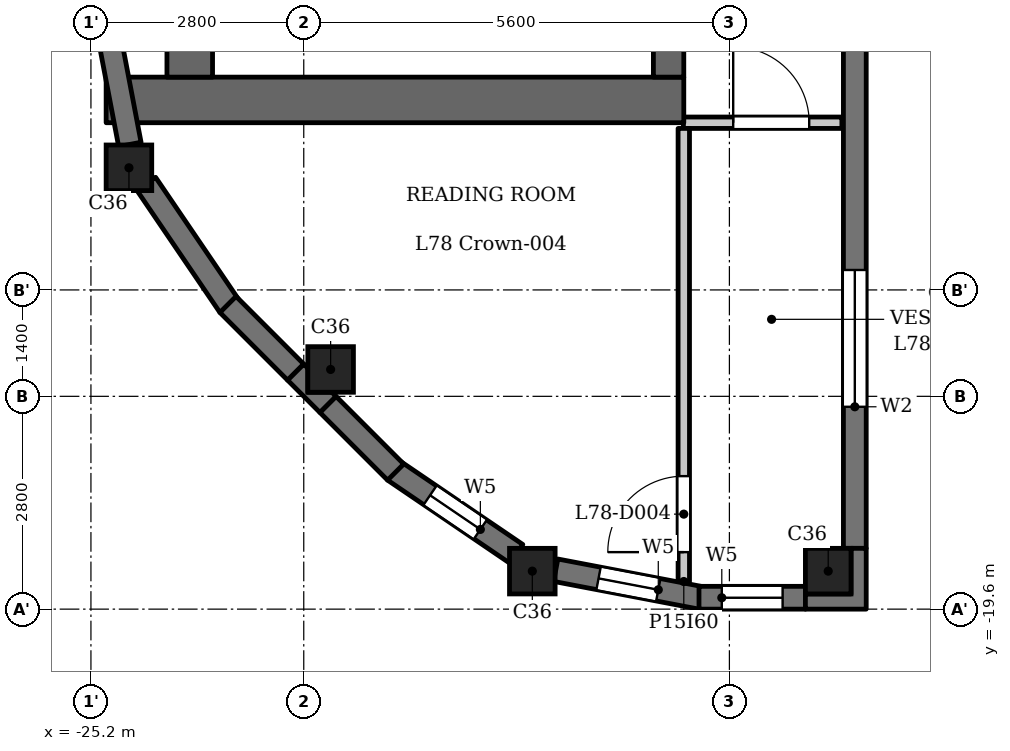
"""IFC4 building model, lengths in metres.
Left out: names, types, materials, properties, quantities, classifications, styles, units other than length and angle.
Written with IfcOpenShell. Run it as: python <this file> out.ifc"""

import sys

from ifc_helpers import new_model, si_unit, direction, frame, frame_2d, origin, origin_2d, place, context, subcontext, project, spatial, polyline, rectangle, outline, extrude, element, fill, save


model = new_model("IFC4")
c1 = context("Model", 3, precision=1e-05, world=origin(), true_north=direction((0.0, 1.0)))
c2 = subcontext(c1, "Body", "Model", "MODEL_VIEW")
j1 = project(units=[si_unit("LENGTHUNIT", "METRE"), si_unit("PLANEANGLEUNIT", "RADIAN")], contexts=[c1])
p1 = place(None, origin())
s1 = spatial("IfcSite", under=j1, at=p1, CompositionType="ELEMENT")
p2 = place(p1, origin())
s2 = spatial("IfcBuilding", under=s1, at=p2, CompositionType="ELEMENT")
p3 = place(p2, frame((0.0, 0.0, 303.4)))
s3 = spatial("IfcBuildingStorey", under=s2, at=p3, CompositionType="ELEMENT", Elevation=303.4)
for number, where, z_axis, x_axis in (
    (1, (-24.7, -13.793, 0.0), (0.0, 0.0, 1.0), (1.0, 0.0, 0.0)),
    (2, (-22.046, -16.446, 0.0), (0.0, 0.0, 1.0), (1.0, 0.0, 0.0)),
    (3, (-19.393, -19.1, 0.0), (0.0, 0.0, 1.0), (1.0, 0.0, 0.0)),
    (4, (-15.5, -19.1, 0.0), (0.0, 0.0, 1.0), (1.0, 0.0, 0.0)),
):
    element("IfcColumn", number, at=place(p3, frame(where, z_axis=z_axis, x_axis=x_axis)), inside=s3, PredefinedType="COLUMN", context=c2, shape_type="SweptSolid", body=[
        extrude(rectangle(XDim=0.6, YDim=0.6, at=origin_2d()), origin(), (0.0, 0.0, 1.0), 3.5),
    ])
p4 = place(p3, frame((-21.213, -17.779, 0.0), z_axis=(0.0, 0.0, 1.0), x_axis=(0.827022075481, -0.562169446579, 0.0)))
e5 = element("IfcWall", 5, at=p4, inside=s3, PredefinedType="SOLIDWALL", context=c2, shape_type="SweptSolid", body=[
    extrude(rectangle(XDim=1.948, YDim=0.3, at=frame_2d((0.974, 0.0))), origin(), (0.0, 0.0, 1.0), 2.6),
])
p5 = place(p4, frame((0.574, 0.0, 0.6)))
e6 = element("IfcOpeningElement", 6, at=p5, cuts=e5, PredefinedType="OPENING", context=c2, shape_type="SweptSolid", body=[
    extrude(rectangle(XDim=0.8, YDim=1.55, at=frame_2d((0.4, 0.775))), frame((0.0, 0.16, 0.0), z_axis=(0.0, -1.0, 0.0), x_axis=(1.0, 0.0, 0.0)), (0.0, 0.0, 1.0), 0.32),
])
p6 = place(p3, frame((-19.085, -19.088, 0.0), z_axis=(0.0, 0.0, 1.0), x_axis=(0.982286967073, -0.187382801553, 0.0)))
e7 = element("IfcWall", 7, at=p6, inside=s3, PredefinedType="SOLIDWALL", context=c2, shape_type="SweptSolid", body=[
    extrude(rectangle(XDim=1.948, YDim=0.3, at=frame_2d((0.974, 0.0))), origin(), (0.0, 0.0, 1.0), 2.6),
])
p7 = place(p6, frame((0.574, 0.0, 0.6)))
e8 = element("IfcOpeningElement", 8, at=p7, cuts=e7, PredefinedType="OPENING", context=c2, shape_type="SweptSolid", body=[
    extrude(rectangle(XDim=0.8, YDim=1.55, at=frame_2d((0.4, 0.775))), frame((0.0, 0.16, 0.0), z_axis=(0.0, -1.0, 0.0), x_axis=(1.0, 0.0, 0.0)), (0.0, 0.0, 1.0), 0.32),
])
p8 = place(p3, frame((-17.2, -19.45, 0.0), z_axis=(0.0, 0.0, 1.0), x_axis=(1.0, 0.0, 0.0)))
e9 = element("IfcWall", 9, at=p8, inside=s3, PredefinedType="SOLIDWALL", context=c2, shape_type="SweptSolid", body=[
    extrude(rectangle(XDim=1.4, YDim=0.3, at=frame_2d((0.7, 0.0))), origin(), (0.0, 0.0, 1.0), 3.2),
])
p9 = place(p8, frame((0.3, 0.0, 0.6)))
e10 = element("IfcOpeningElement", 10, at=p9, cuts=e9, PredefinedType="OPENING", context=c2, shape_type="SweptSolid", body=[
    extrude(rectangle(XDim=0.8, YDim=1.55, at=frame_2d((0.4, 0.775))), frame((0.0, 0.16, 0.0), z_axis=(0.0, -1.0, 0.0), x_axis=(1.0, 0.0, 0.0)), (0.0, 0.0, 1.0), 0.32),
])
p10 = place(p3, frame((-15.15, -18.8, 0.0), z_axis=(0.0, 0.0, 1.0), x_axis=(0.0, 1.0, 0.0)))
e11 = element("IfcWall", 11, at=p10, inside=s3, PredefinedType="SOLIDWALL", context=c2, shape_type="SweptSolid", body=[
    extrude(rectangle(XDim=7.3, YDim=0.3, at=frame_2d((3.65, 0.0))), origin(), (0.0, 0.0, 1.0), 3.2),
])
p11 = place(p10, frame((1.863, 0.0, 0.9)))
e12 = element("IfcOpeningElement", 12, at=p11, cuts=e11, PredefinedType="OPENING", context=c2, shape_type="SweptSolid", body=[
    extrude(rectangle(XDim=1.8, YDim=1.25, at=frame_2d((0.9, 0.625))), frame((0.0, 0.16, 0.0), z_axis=(0.0, -1.0, 0.0), x_axis=(1.0, 0.0, 0.0)), (0.0, 0.0, 1.0), 0.32),
])
p12 = place(p3, frame((-25.052, -11.573, 0.0), z_axis=(0.0, 0.0, 1.0), x_axis=(0.187354129902, -0.982292436095, 0.0)))
e13 = element("IfcWall", 13, at=p12, inside=s3, PredefinedType="SOLIDWALL", context=c2, shape_type="SweptSolid", body=[
    extrude(rectangle(XDim=1.947, YDim=0.3, at=frame_2d((0.973, 0.0))), origin(), (0.0, 0.0, 1.0), 2.6),
])
p13 = place(p3, frame((-24.474, -14.002, 0.0), z_axis=(0.0, 0.0, 1.0), x_axis=(0.562025435703, -0.827119948752, 0.0)))
e14 = element("IfcWall", 14, at=p13, inside=s3, PredefinedType="SOLIDWALL", context=c2, shape_type="SweptSolid", body=[
    extrude(rectangle(XDim=1.948, YDim=0.3, at=frame_2d((0.974, 0.0))), origin(), (0.0, 0.0, 1.0), 2.6),
])
for number, where, z_axis, x_axis in (
    (15, (-23.397, -15.591, 0.0), (0.0, 0.0, 1.0), (0.707, -0.707, 0.0)),
    (16, (-22.082, -16.906, 0.0), (0.0, 0.0, 1.0), (0.707, -0.707, 0.0)),
):
    element("IfcWall", number, at=place(p3, frame(where, z_axis=z_axis, x_axis=x_axis)), inside=s3, PredefinedType="SOLIDWALL", context=c2, shape_type="SweptSolid", body=[
        extrude(rectangle(XDim=1.26, YDim=0.3, at=frame_2d((0.63, 0.0))), origin(), (0.0, 0.0, 1.0), 3.2),
    ])
p14 = place(p3, frame((-17.4, -12.9, 0.0), z_axis=(0.0, 0.0, 1.0), x_axis=(-1.0, 0.0, 0.0)))
e17 = element("IfcWall", 17, at=p14, inside=s3, PredefinedType="SHEAR", context=c2, shape_type="SweptSolid", body=[
    extrude(rectangle(XDim=7.6, YDim=0.6, at=frame_2d((3.8, 0.0))), origin(), (0.0, 0.0, 1.0), 3.2),
])
p15 = place(p3, frame((-17.6, -12.6, 0.0), z_axis=(0.0, 0.0, 1.0), x_axis=(0.0, 1.0, 0.0)))
e18 = element("IfcWall", 18, at=p15, inside=s3, PredefinedType="SHEAR", context=c2, shape_type="SweptSolid", body=[
    extrude(rectangle(XDim=25.2, YDim=0.4, at=frame_2d((12.6, 0.0))), origin(), (0.0, 0.0, 1.0), 3.2),
])
p16 = place(p15, frame((8.8, 0.0, 0.0)))
e19 = element("IfcOpeningElement", 19, at=p16, cuts=e18, PredefinedType="OPENING", context=c2, shape_type="SweptSolid", body=[
    extrude(rectangle(XDim=0.9, YDim=2.1, at=frame_2d((0.45, 1.05))), frame((0.0, 0.21, 0.0), z_axis=(0.0, -1.0, 0.0), x_axis=(1.0, 0.0, 0.0)), (0.0, 0.0, 1.0), 0.42),
])
p17 = place(p15, frame((17.05, 0.0, 0.0)))
e20 = element("IfcOpeningElement", 20, at=p17, cuts=e18, PredefinedType="OPENING", context=c2, shape_type="SweptSolid", body=[
    extrude(rectangle(XDim=0.9, YDim=2.1, at=frame_2d((0.45, 1.05))), frame((0.0, 0.21, 0.0), z_axis=(0.0, -1.0, 0.0), x_axis=(1.0, 0.0, 0.0)), (0.0, 0.0, 1.0), 0.42),
])
p18 = place(p15, frame((23.25, 0.0, 0.0)))
e21 = element("IfcOpeningElement", 21, at=p18, cuts=e18, PredefinedType="OPENING", context=c2, shape_type="SweptSolid", body=[
    extrude(rectangle(XDim=1.1, YDim=2.1, at=frame_2d((0.55, 1.05))), frame((0.0, 0.21, 0.0), z_axis=(0.0, -1.0, 0.0), x_axis=(1.0, 0.0, 0.0)), (0.0, 0.0, 1.0), 0.42),
])
p19 = place(p15, frame((0.85, 0.0, 0.0)))
e22 = element("IfcOpeningElement", 22, at=p19, cuts=e18, PredefinedType="OPENING", context=c2, shape_type="SweptSolid", body=[
    extrude(rectangle(XDim=1.1, YDim=2.1, at=frame_2d((0.55, 1.05))), frame((0.0, 0.21, 0.0), z_axis=(0.0, -1.0, 0.0), x_axis=(1.0, 0.0, 0.0)), (0.0, 0.0, 1.0), 0.42),
])
p20 = place(p15, frame((13.075, 0.0, 0.0)))
e23 = element("IfcOpeningElement", 23, at=p20, cuts=e18, PredefinedType="OPENING", context=c2, shape_type="SweptSolid", body=[
    extrude(rectangle(XDim=1.8, YDim=2.1, at=frame_2d((0.9, 1.05))), frame((0.0, 0.21, 0.0), z_axis=(0.0, -1.0, 0.0), x_axis=(1.0, 0.0, 0.0)), (0.0, 0.0, 1.0), 0.42),
])
p21 = place(p3, frame((-23.9, -12.6, 0.0), z_axis=(0.0, 0.0, 1.0), x_axis=(0.0, 1.0, 0.0)))
e24 = element("IfcWall", 24, at=p21, inside=s3, PredefinedType="SHEAR", context=c2, shape_type="SweptSolid", body=[
    extrude(rectangle(XDim=25.2, YDim=0.6, at=frame_2d((12.6, 0.0))), origin(), (0.0, 0.0, 1.0), 3.2),
])
p22 = place(p3, frame((-17.405, -13.2, 0.0), z_axis=(0.0, 0.0, 1.0), x_axis=(1.0, 0.0, 0.0)))
e25 = element("IfcWall", 25, at=p22, inside=s3, PredefinedType="PARTITIONING", context=c2, shape_type="SweptSolid", body=[
    extrude(rectangle(XDim=2.085, YDim=0.15, at=frame_2d((1.042, 0.0))), origin(), (0.0, 0.0, 1.0), 3.2),
])
p23 = place(p22, frame((0.655, 0.0, 0.0)))
e26 = element("IfcOpeningElement", 26, at=p23, cuts=e25, PredefinedType="OPENING", context=c2, shape_type="SweptSolid", body=[
    extrude(rectangle(XDim=1.0, YDim=2.1, at=frame_2d((0.5, 1.05))), frame((0.0, 0.085, 0.0), z_axis=(0.0, -1.0, 0.0), x_axis=(1.0, 0.0, 0.0)), (0.0, 0.0, 1.0), 0.17),
])
p24 = place(p3, frame((-17.4, -19.236, 0.0), z_axis=(0.0, 0.0, 1.0), x_axis=(0.0, 1.0, 0.0)))
e27 = element("IfcWall", 27, at=p24, inside=s3, PredefinedType="PARTITIONING", context=c2, shape_type="SweptSolid", body=[
    extrude(rectangle(XDim=5.961, YDim=0.15, at=frame_2d((2.981, 0.0))), origin(), (0.0, 0.0, 1.0), 3.2),
])
p25 = place(p24, frame((0.386, 0.0, 0.0)))
e28 = element("IfcOpeningElement", 28, at=p25, cuts=e27, PredefinedType="OPENING", context=c2, shape_type="SweptSolid", body=[
    extrude(rectangle(XDim=1.0, YDim=2.1, at=frame_2d((0.5, 1.05))), frame((0.0, 0.085, 0.0), z_axis=(0.0, -1.0, 0.0), x_axis=(1.0, 0.0, 0.0)), (0.0, 0.0, 1.0), 0.17),
])
p26 = place(p3, origin())
e29 = element("IfcWall", 29, at=p26, inside=s3, PredefinedType="SOLIDWALL", context=c2, shape_type="SweptSolid", body=[
    extrude(outline(polyline([(-15.8, -19.6), (-15.0, -19.6), (-15.0, -18.8), (-15.2, -18.8), (-15.2, -19.4), (-15.8, -19.4), (-15.8, -19.6)])), origin(), (0.0, 0.0, 1.0), 3.2),
])
e30 = element("IfcWall", 30, at=p26, inside=s3, PredefinedType="SOLIDWALL", context=c2, shape_type="SweptSolid", body=[
    extrude(outline(polyline([(-22.4, -16.376), (-22.612, -16.588), (-22.188, -17.012), (-21.976, -16.8), (-22.029, -16.746), (-22.346, -16.746), (-22.346, -16.429), (-22.4, -16.376)])), origin(), (0.0, 0.0, 1.0), 3.2),
])
p27 = place(p23, origin())
e31 = element("IfcDoor", 31, at=p27, inside=s3, OperationType="SINGLE_SWING_RIGHT", PredefinedType="DOOR", context=c2, shape_type="SweptSolid", body=[
    extrude(rectangle(XDim=1.0, YDim=2.1, at=frame_2d((0.5, 1.05))), frame((0.0, 0.025, 0.0), z_axis=(0.0, -1.0, 0.0), x_axis=(1.0, 0.0, 0.0)), (0.0, 0.0, 1.0), 0.05),
])
fill(e26, e31)
p28 = place(p25, origin())
e32 = element("IfcDoor", 32, at=p28, inside=s3, OperationType="SINGLE_SWING_RIGHT", PredefinedType="DOOR", context=c2, shape_type="SweptSolid", body=[
    extrude(rectangle(XDim=1.0, YDim=2.1, at=frame_2d((0.5, 1.05))), frame((0.0, 0.025, 0.0), z_axis=(0.0, -1.0, 0.0), x_axis=(1.0, 0.0, 0.0)), (0.0, 0.0, 1.0), 0.05),
])
fill(e28, e32)
p29 = place(p5, origin())
e33 = element("IfcWindow", 33, at=p29, inside=s3, PartitioningType="SINGLE_PANEL", PredefinedType="WINDOW", context=c2, shape_type="SweptSolid", body=[
    extrude(rectangle(XDim=0.8, YDim=1.55, at=frame_2d((0.4, 0.775))), frame((0.0, 0.03, 0.0), z_axis=(0.0, -1.0, 0.0), x_axis=(1.0, 0.0, 0.0)), (0.0, 0.0, 1.0), 0.06),
])
fill(e6, e33)
p30 = place(p7, origin())
e34 = element("IfcWindow", 34, at=p30, inside=s3, PartitioningType="SINGLE_PANEL", PredefinedType="WINDOW", context=c2, shape_type="SweptSolid", body=[
    extrude(rectangle(XDim=0.8, YDim=1.55, at=frame_2d((0.4, 0.775))), frame((0.0, 0.03, 0.0), z_axis=(0.0, -1.0, 0.0), x_axis=(1.0, 0.0, 0.0)), (0.0, 0.0, 1.0), 0.06),
])
fill(e8, e34)
p31 = place(p9, origin())
e35 = element("IfcWindow", 35, at=p31, inside=s3, PartitioningType="SINGLE_PANEL", PredefinedType="WINDOW", context=c2, shape_type="SweptSolid", body=[
    extrude(rectangle(XDim=0.8, YDim=1.55, at=frame_2d((0.4, 0.775))), frame((0.0, 0.03, 0.0), z_axis=(0.0, -1.0, 0.0), x_axis=(1.0, 0.0, 0.0)), (0.0, 0.0, 1.0), 0.06),
])
fill(e10, e35)
p32 = place(p11, origin())
e36 = element("IfcWindow", 36, at=p32, inside=s3, PartitioningType="SINGLE_PANEL", PredefinedType="WINDOW", context=c2, shape_type="SweptSolid", body=[
    extrude(rectangle(XDim=1.8, YDim=1.25, at=frame_2d((0.9, 0.625))), frame((0.0, 0.03, 0.0), z_axis=(0.0, -1.0, 0.0), x_axis=(1.0, 0.0, 0.0)), (0.0, 0.0, 1.0), 0.06),
])
fill(e12, e36)
save(model, sys.argv[1])
